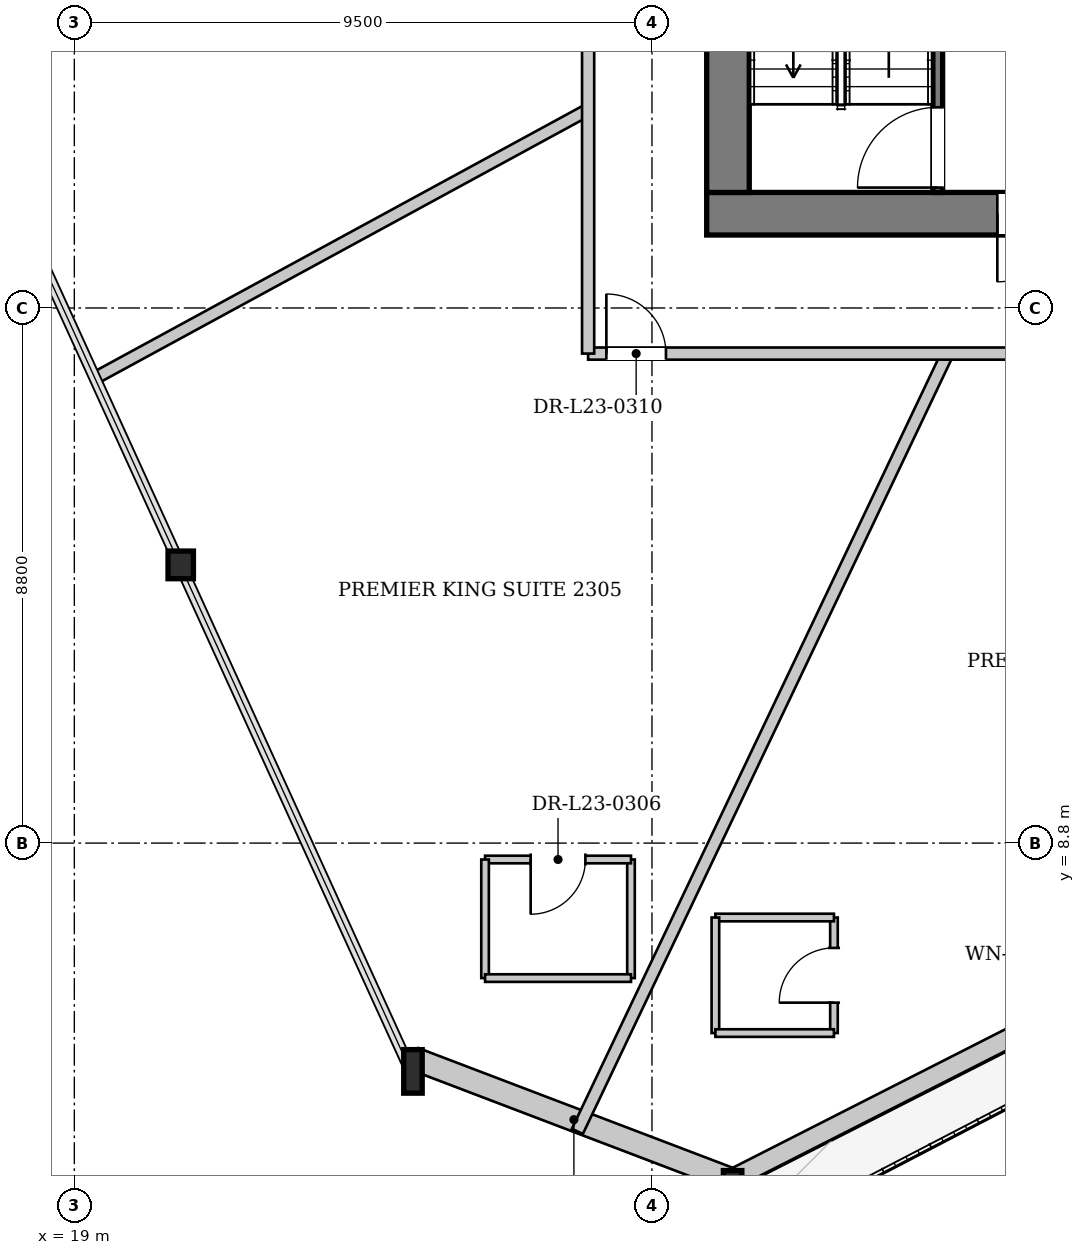
"""IFC4 building model, lengths in metres.
Left out: names, types, materials, properties, quantities, classifications, styles, units other than length and angle.
Written with IfcOpenShell. Run it as: python <this file> out.ifc"""

import sys

from ifc_helpers import new_model, si_unit, direction, frame, frame_2d, origin, origin_2d, place, context, subcontext, project, spatial, rectangle, i_section, extrude, source, transform, mapped, element, fill, save


model = new_model("IFC4")
c1 = context("Model", 3, precision=1e-05, world=origin(), true_north=direction((0.0, 1.0)))
c2 = subcontext(c1, "Body", "Model", "MODEL_VIEW")
j1 = project(units=[si_unit("LENGTHUNIT", "METRE"), si_unit("PLANEANGLEUNIT", "RADIAN")], contexts=[c1])
p1 = place(None, origin())
s1 = spatial("IfcSite", under=j1, at=p1, CompositionType="ELEMENT")
p2 = place(p1, origin())
s2 = spatial("IfcBuilding", under=s1, at=p2, CompositionType="ELEMENT")
p3 = place(p2, frame((0.0, 0.0, 91.5)))
s3 = spatial("IfcBuildingStorey", under=s2, at=p3, CompositionType="ELEMENT", Elevation=91.5)
m1 = source(origin(), c2, "Body", "SweptSolid", [
    extrude(i_section(OverallWidth=0.418, OverallDepth=0.455, WebThickness=0.038, FlangeThickness=0.059, at=origin_2d()), origin(), (0.0, 0.0, 1.0), 3.386),
])
p4 = place(p3, frame((20.721, 13.413, 0.0), z_axis=(0.01701461502, -0.022205514517, 0.999608632416), x_axis=(0.793772252569, 0.608215102618, 0.0)))
e1 = element("IfcColumn", 1, at=p4, inside=s3, PredefinedType="COLUMN", context=c2, shape_type="MappedRepresentation", body=[
    mapped(m1, transform((0.0, 0.0, 0.0), x_axis=(1.0, 0.0, 0.0), y_axis=(0.0, 1.0, 0.0), z_axis=(0.0, 0.0, 1.0), scale=1.0)),
])
m2 = source(origin(), c2, "Body", "SweptSolid", [
    extrude(i_section(OverallWidth=0.304, OverallDepth=0.716, WebThickness=0.021, FlangeThickness=0.04, at=origin_2d()), origin(), (0.0, 0.0, 1.0), 3.387),
])
p5 = place(p3, frame((24.522, 5.075, 0.0), z_axis=(0.027752907326, -0.017300513658, 0.999465091117), x_axis=(0.529007926798, 0.848616882571, 0.0)))
e2 = element("IfcColumn", 2, at=p5, inside=s3, PredefinedType="COLUMN", context=c2, shape_type="MappedRepresentation", body=[
    mapped(m2, transform((0.0, 0.0, 0.0), x_axis=(1.0, 0.0, 0.0), y_axis=(0.0, 1.0, 0.0), z_axis=(0.0, 0.0, 1.0), scale=1.0)),
])
p6 = place(p3, frame((51.232, 14.159, 0.0), z_axis=(0.0, 0.0, 1.0), x_axis=(-0.891474274581, -0.453071316417, 0.0)))
e3 = element("IfcWall", 3, at=p6, inside=s3, PredefinedType="SOLIDWALL", context=c2, shape_type="SweptSolid", body=[
    extrude(rectangle(XDim=24.15, YDim=0.32, at=frame_2d((12.075, 0.0))), origin(), (0.0, 0.0, 1.0), 2.692),
])
p7 = place(p6, frame((7.178, 0.0, 0.0)))
e4 = element("IfcOpeningElement", 4, at=p7, cuts=e3, PredefinedType="OPENING", context=c2, shape_type="SweptSolid", body=[
    extrude(rectangle(XDim=1.1, YDim=2.3, at=frame_2d((0.55, 1.15))), frame((0.0, 0.17, 0.0), z_axis=(0.0, -1.0, 0.0), x_axis=(1.0, 0.0, 0.0)), (0.0, 0.0, 1.0), 0.34),
])
p8 = place(p6, frame((16.971, 0.0, 0.372)))
e5 = element("IfcOpeningElement", 5, at=p8, cuts=e3, PredefinedType="OPENING", context=c2, shape_type="SweptSolid", body=[
    extrude(rectangle(XDim=1.8, YDim=2.2, at=frame_2d((0.9, 1.1))), frame((0.0, 0.17, 0.0), z_axis=(0.0, -1.0, 0.0), x_axis=(1.0, 0.0, 0.0)), (0.0, 0.0, 1.0), 0.34),
])
p9 = place(p3, frame((29.842, 3.252, 0.0), z_axis=(0.0, 0.0, 1.0), x_axis=(-0.934519383399, 0.355912239255, 0.0)))
e6 = element("IfcWall", 6, at=p9, inside=s3, PredefinedType="SOLIDWALL", context=c2, shape_type="SweptSolid", body=[
    extrude(rectangle(XDim=5.621, YDim=0.38, at=frame_2d((2.811, 0.0))), origin(), (0.0, 0.0, 1.0), 2.692),
])
p10 = place(p3, frame((46.6, 19.15, 0.0), z_axis=(0.0, 0.0, 1.0), x_axis=(-1.0, 0.0, 0.0)))
e7 = element("IfcWall", 7, at=p10, inside=s3, PredefinedType="SHEAR", context=c2, shape_type="SweptSolid", body=[
    extrude(rectangle(XDim=17.2, YDim=0.7, at=frame_2d((8.6, 0.0))), origin(), (0.0, 0.0, 1.0), 3.3),
])
p11 = place(p10, frame((4.8, 0.0, 0.0)))
e8 = element("IfcOpeningElement", 8, at=p11, cuts=e7, PredefinedType="OPENING", context=c2, shape_type="SweptSolid", body=[
    extrude(rectangle(XDim=1.12, YDim=2.25, at=frame_2d((0.56, 1.125))), frame((0.0, 0.36, 0.0), z_axis=(0.0, -1.0, 0.0), x_axis=(1.0, 0.0, 0.0)), (0.0, 0.0, 1.0), 0.72),
])
p12 = place(p10, frame((11.3, 0.0, 0.0)))
e9 = element("IfcOpeningElement", 9, at=p12, cuts=e7, PredefinedType="OPENING", context=c2, shape_type="SweptSolid", body=[
    extrude(rectangle(XDim=1.12, YDim=2.25, at=frame_2d((0.56, 1.125))), frame((0.0, 0.36, 0.0), z_axis=(0.0, -1.0, 0.0), x_axis=(1.0, 0.0, 0.0)), (0.0, 0.0, 1.0), 0.72),
])
p13 = place(p3, frame((29.75, 19.5, 0.0), z_axis=(0.0, 0.0, 1.0), x_axis=(0.0, 1.0, 0.0)))
e10 = element("IfcWall", 10, at=p13, inside=s3, PredefinedType="SHEAR", context=c2, shape_type="SweptSolid", body=[
    extrude(rectangle(XDim=14.2, YDim=0.7, at=frame_2d((7.1, 0.0))), origin(), (0.0, 0.0, 1.0), 3.3),
])
p14 = place(p13, frame((7.42, 0.0, 0.0)))
e11 = element("IfcOpeningElement", 11, at=p14, cuts=e10, PredefinedType="OPENING", context=c2, shape_type="SweptSolid", body=[
    extrude(rectangle(XDim=1.6, YDim=2.2, at=frame_2d((0.8, 1.1))), frame((0.0, 0.36, 0.0), z_axis=(0.0, -1.0, 0.0), x_axis=(1.0, 0.0, 0.0)), (0.0, 0.0, 1.0), 0.72),
])
p15 = place(p3, frame((33.2, 19.5, 0.0), z_axis=(0.0, 0.0, 1.0), x_axis=(0.0, 1.0, 0.0)))
e12 = element("IfcWall", 12, at=p15, inside=s3, PredefinedType="PARTITIONING", context=c2, shape_type="SweptSolid", body=[
    extrude(rectangle(XDim=7.46, YDim=0.16, at=frame_2d((3.73, 0.0))), origin(), (0.0, 0.0, 1.0), 3.3),
])
p16 = place(p15, frame((0.08, 0.0, 0.0)))
e13 = element("IfcOpeningElement", 13, at=p16, cuts=e12, PredefinedType="OPENING", context=c2, shape_type="SweptSolid", body=[
    extrude(rectangle(XDim=1.32, YDim=2.2, at=frame_2d((0.66, 1.1))), frame((0.0, 0.09, 0.0), z_axis=(0.0, -1.0, 0.0), x_axis=(1.0, 0.0, 0.0)), (0.0, 0.0, 1.0), 0.18),
])
p17 = place(p3, frame((27.45, 20.86, 0.0), z_axis=(0.0, 0.0, 1.0), x_axis=(-0.878400885475, -0.477924559315, 0.0)))
e14 = element("IfcWall", 14, at=p17, inside=s3, PredefinedType="PARTITIONING", context=c2, shape_type="SweptSolid", body=[
    extrude(rectangle(XDim=9.205, YDim=0.2, at=frame_2d((4.603, 0.0))), origin(), (0.0, 0.0, 1.0), 3.3),
])
p18 = place(p3, frame((33.36, 16.85, 0.0), z_axis=(0.0, 0.0, 1.0), x_axis=(-0.429721491406, -0.902961483024, 0.0)))
e15 = element("IfcWall", 15, at=p18, inside=s3, PredefinedType="PARTITIONING", context=c2, shape_type="SweptSolid", body=[
    extrude(rectangle(XDim=14.165, YDim=0.2, at=frame_2d((7.083, 0.0))), origin(), (0.0, 0.0, 1.0), 3.3),
])
p19 = place(p3, frame((28.155, 6.58, 0.0), z_axis=(0.0, 0.0, 1.0), x_axis=(0.0, 1.0, 0.0)))
e16 = element("IfcWall", 16, at=p19, inside=s3, PredefinedType="PARTITIONING", context=c2, shape_type="SweptSolid", body=[
    extrude(rectangle(XDim=1.95, YDim=0.125, at=frame_2d((0.975, 0.0))), origin(), (0.0, 0.0, 1.0), 3.3),
])
p20 = place(p3, frame((28.155, 8.53, 0.0), z_axis=(0.0, 0.0, 1.0), x_axis=(-1.0, 0.0, 0.0)))
e17 = element("IfcWall", 17, at=p20, inside=s3, PredefinedType="PARTITIONING", context=c2, shape_type="SweptSolid", body=[
    extrude(rectangle(XDim=2.4, YDim=0.125, at=frame_2d((1.2, 0.0))), origin(), (0.0, 0.0, 1.0), 3.3),
])
p21 = place(p20, frame((0.75, 0.0, 0.0)))
e18 = element("IfcOpeningElement", 18, at=p21, cuts=e17, PredefinedType="OPENING", context=c2, shape_type="SweptSolid", body=[
    extrude(rectangle(XDim=0.9, YDim=2.1, at=frame_2d((0.45, 1.05))), frame((0.0, 0.073, 0.0), z_axis=(0.0, -1.0, 0.0), x_axis=(1.0, 0.0, 0.0)), (0.0, 0.0, 1.0), 0.145),
])
p22 = place(p3, frame((25.755, 8.53, 0.0), z_axis=(0.0, 0.0, 1.0), x_axis=(0.0, -1.0, 0.0)))
e19 = element("IfcWall", 19, at=p22, inside=s3, PredefinedType="PARTITIONING", context=c2, shape_type="SweptSolid", body=[
    extrude(rectangle(XDim=1.95, YDim=0.125, at=frame_2d((0.975, 0.0))), origin(), (0.0, 0.0, 1.0), 2.795),
])
p23 = place(p3, frame((25.755, 6.58, 0.0), z_axis=(0.0, 0.0, 1.0), x_axis=(1.0, 0.0, 0.0)))
e20 = element("IfcWall", 20, at=p23, inside=s3, PredefinedType="PARTITIONING", context=c2, shape_type="SweptSolid", body=[
    extrude(rectangle(XDim=2.4, YDim=0.125, at=frame_2d((1.2, 0.0))), origin(), (0.0, 0.0, 1.0), 3.3),
])
p24 = place(p3, frame((31.493, 5.676, 0.0), z_axis=(0.0, 0.0, 1.0), x_axis=(0.0, 1.0, 0.0)))
e21 = element("IfcWall", 21, at=p24, inside=s3, PredefinedType="PARTITIONING", context=c2, shape_type="SweptSolid", body=[
    extrude(rectangle(XDim=1.9, YDim=0.125, at=frame_2d((0.95, 0.0))), origin(), (0.0, 0.0, 1.0), 2.795),
])
p25 = place(p24, frame((0.5, 0.0, 0.0)))
e22 = element("IfcOpeningElement", 22, at=p25, cuts=e21, PredefinedType="OPENING", context=c2, shape_type="SweptSolid", body=[
    extrude(rectangle(XDim=0.9, YDim=2.1, at=frame_2d((0.45, 1.05))), frame((0.0, 0.073, 0.0), z_axis=(0.0, -1.0, 0.0), x_axis=(1.0, 0.0, 0.0)), (0.0, 0.0, 1.0), 0.145),
])
p26 = place(p3, frame((31.493, 7.576, 0.0), z_axis=(0.0, 0.0, 1.0), x_axis=(-1.0, 0.0, 0.0)))
e23 = element("IfcWall", 23, at=p26, inside=s3, PredefinedType="PARTITIONING", context=c2, shape_type="SweptSolid", body=[
    extrude(rectangle(XDim=1.95, YDim=0.125, at=frame_2d((0.975, 0.0))), origin(), (0.0, 0.0, 1.0), 3.3),
])
p27 = place(p3, frame((29.543, 7.576, 0.0), z_axis=(0.0, 0.0, 1.0), x_axis=(0.0, -1.0, 0.0)))
e24 = element("IfcWall", 24, at=p27, inside=s3, PredefinedType="PARTITIONING", context=c2, shape_type="SweptSolid", body=[
    extrude(rectangle(XDim=1.9, YDim=0.125, at=frame_2d((0.95, 0.0))), origin(), (0.0, 0.0, 1.0), 3.3),
])
p28 = place(p3, frame((29.543, 5.676, 0.0), z_axis=(0.0, 0.0, 1.0), x_axis=(1.0, 0.0, 0.0)))
e25 = element("IfcWall", 25, at=p28, inside=s3, PredefinedType="PARTITIONING", context=c2, shape_type="SweptSolid", body=[
    extrude(rectangle(XDim=1.95, YDim=0.125, at=frame_2d((0.975, 0.0))), origin(), (0.0, 0.0, 1.0), 3.3),
])
p29 = place(p3, frame((27.45, 16.85, 0.0), z_axis=(0.0, 0.0, 1.0), x_axis=(1.0, 0.0, 0.0)))
e26 = element("IfcWall", 26, at=p29, inside=s3, PredefinedType="PARTITIONING", context=c2, shape_type="SweptSolid", body=[
    extrude(rectangle(XDim=21.1, YDim=0.2, at=frame_2d((10.55, 0.0))), origin(), (0.0, 0.0, 1.0), 3.3),
])
p30 = place(p29, frame((0.3, 0.0, 0.0)))
e27 = element("IfcOpeningElement", 27, at=p30, cuts=e26, PredefinedType="OPENING", context=c2, shape_type="SweptSolid", body=[
    extrude(rectangle(XDim=0.98, YDim=2.15, at=frame_2d((0.49, 1.075))), frame((0.0, 0.11, 0.0), z_axis=(0.0, -1.0, 0.0), x_axis=(1.0, 0.0, 0.0)), (0.0, 0.0, 1.0), 0.22),
])
p31 = place(p29, frame((8.092, 0.0, 0.0)))
e28 = element("IfcOpeningElement", 28, at=p31, cuts=e26, PredefinedType="OPENING", context=c2, shape_type="SweptSolid", body=[
    extrude(rectangle(XDim=0.98, YDim=2.15, at=frame_2d((0.49, 1.075))), frame((0.0, 0.11, 0.0), z_axis=(0.0, -1.0, 0.0), x_axis=(1.0, 0.0, 0.0)), (0.0, 0.0, 1.0), 0.22),
])
p32 = place(p29, frame((18.251, 0.0, 0.0)))
e29 = element("IfcOpeningElement", 29, at=p32, cuts=e26, PredefinedType="OPENING", context=c2, shape_type="SweptSolid", body=[
    extrude(rectangle(XDim=0.98, YDim=2.15, at=frame_2d((0.49, 1.075))), frame((0.0, 0.11, 0.0), z_axis=(0.0, -1.0, 0.0), x_axis=(1.0, 0.0, 0.0)), (0.0, 0.0, 1.0), 0.22),
])
p33 = place(p3, frame((27.45, 16.85, 0.0), z_axis=(0.0, 0.0, 1.0), x_axis=(0.0, 1.0, 0.0)))
e30 = element("IfcWall", 30, at=p33, inside=s3, PredefinedType="PARTITIONING", context=c2, shape_type="SweptSolid", body=[
    extrude(rectangle(XDim=19.5, YDim=0.2, at=frame_2d((9.75, 0.0))), origin(), (0.0, 0.0, 1.0), 3.3),
])
p34 = place(p33, frame((15.48, 0.0, 0.0)))
e31 = element("IfcOpeningElement", 31, at=p34, cuts=e30, PredefinedType="OPENING", context=c2, shape_type="SweptSolid", body=[
    extrude(rectangle(XDim=0.98, YDim=2.15, at=frame_2d((0.49, 1.075))), frame((0.0, 0.11, 0.0), z_axis=(0.0, -1.0, 0.0), x_axis=(1.0, 0.0, 0.0)), (0.0, 0.0, 1.0), 0.22),
])
p35 = place(p33, frame((6.454, 0.0, 0.0)))
e32 = element("IfcOpeningElement", 32, at=p35, cuts=e30, PredefinedType="OPENING", context=c2, shape_type="SweptSolid", body=[
    extrude(rectangle(XDim=0.98, YDim=2.15, at=frame_2d((0.49, 1.075))), frame((0.0, 0.11, 0.0), z_axis=(0.0, -1.0, 0.0), x_axis=(1.0, 0.0, 0.0)), (0.0, 0.0, 1.0), 0.22),
])
m3 = source(origin(), c2, "Body", "SweptSolid", [
    extrude(rectangle(XDim=1.12, YDim=2.25, at=frame_2d((0.56, 1.125))), frame((0.0, 0.025, 0.0), z_axis=(0.0, -1.0, 0.0), x_axis=(1.0, 0.0, 0.0)), (0.0, 0.0, 1.0), 0.05),
])
p36 = place(p12, origin())
e33 = element("IfcDoor", 33, at=p36, inside=s3, OperationType="SINGLE_SWING_RIGHT", PredefinedType="DOOR", context=c2, shape_type="MappedRepresentation", body=[
    mapped(m3, transform((0.0, 0.0, 0.0), x_axis=(1.0, 0.0, 0.0), y_axis=(0.0, 1.0, 0.0), z_axis=(0.0, 0.0, 1.0), scale=1.0)),
])
fill(e9, e33)
m4 = source(origin(), c2, "Body", "SweptSolid", [
    extrude(rectangle(XDim=1.32, YDim=2.2, at=frame_2d((0.66, 1.1))), frame((0.0, 0.025, 0.0), z_axis=(0.0, -1.0, 0.0), x_axis=(1.0, 0.0, 0.0)), (0.0, 0.0, 1.0), 0.05),
])
p37 = place(p16, origin())
e34 = element("IfcDoor", 34, at=p37, inside=s3, OperationType="SINGLE_SWING_LEFT", PredefinedType="DOOR", context=c2, shape_type="MappedRepresentation", body=[
    mapped(m4, transform((0.0, 0.0, 0.0), x_axis=(1.0, 0.0, 0.0), y_axis=(0.0, 1.0, 0.0), z_axis=(0.0, 0.0, 1.0), scale=1.0)),
])
fill(e13, e34)
m5 = source(origin(), c2, "Body", "SweptSolid", [
    extrude(rectangle(XDim=0.9, YDim=2.1, at=frame_2d((0.45, 1.05))), frame((0.0, 0.025, 0.0), z_axis=(0.0, -1.0, 0.0), x_axis=(1.0, 0.0, 0.0)), (0.0, 0.0, 1.0), 0.05),
])
p38 = place(p21, origin())
e35 = element("IfcDoor", 35, at=p38, inside=s3, OperationType="SINGLE_SWING_RIGHT", PredefinedType="DOOR", context=c2, shape_type="MappedRepresentation", body=[
    mapped(m5, transform((0.0, 0.0, 0.0), x_axis=(1.0, 0.0, 0.0), y_axis=(0.0, 1.0, 0.0), z_axis=(0.0, 0.0, 1.0), scale=1.0)),
])
fill(e18, e35)
p39 = place(p25, origin())
e36 = element("IfcDoor", 36, at=p39, inside=s3, OperationType="SINGLE_SWING_LEFT", PredefinedType="DOOR", context=c2, shape_type="MappedRepresentation", body=[
    mapped(m5, transform((0.0, 0.0, 0.0), x_axis=(1.0, 0.0, 0.0), y_axis=(0.0, 1.0, 0.0), z_axis=(0.0, 0.0, 1.0), scale=1.0)),
])
fill(e22, e36)
m6 = source(origin(), c2, "Body", "SweptSolid", [
    extrude(rectangle(XDim=0.98, YDim=2.15, at=frame_2d((0.49, 1.075))), frame((0.0, 0.025, 0.0), z_axis=(0.0, -1.0, 0.0), x_axis=(1.0, 0.0, 0.0)), (0.0, 0.0, 1.0), 0.05),
])
p40 = place(p30, origin())
e37 = element("IfcDoor", 37, at=p40, inside=s3, OperationType="SINGLE_SWING_LEFT", PredefinedType="DOOR", context=c2, shape_type="MappedRepresentation", body=[
    mapped(m6, transform((0.0, 0.0, 0.0), x_axis=(1.0, 0.0, 0.0), y_axis=(0.0, 1.0, 0.0), z_axis=(0.0, 0.0, 1.0), scale=1.0)),
])
fill(e27, e37)
save(model, sys.argv[1])
